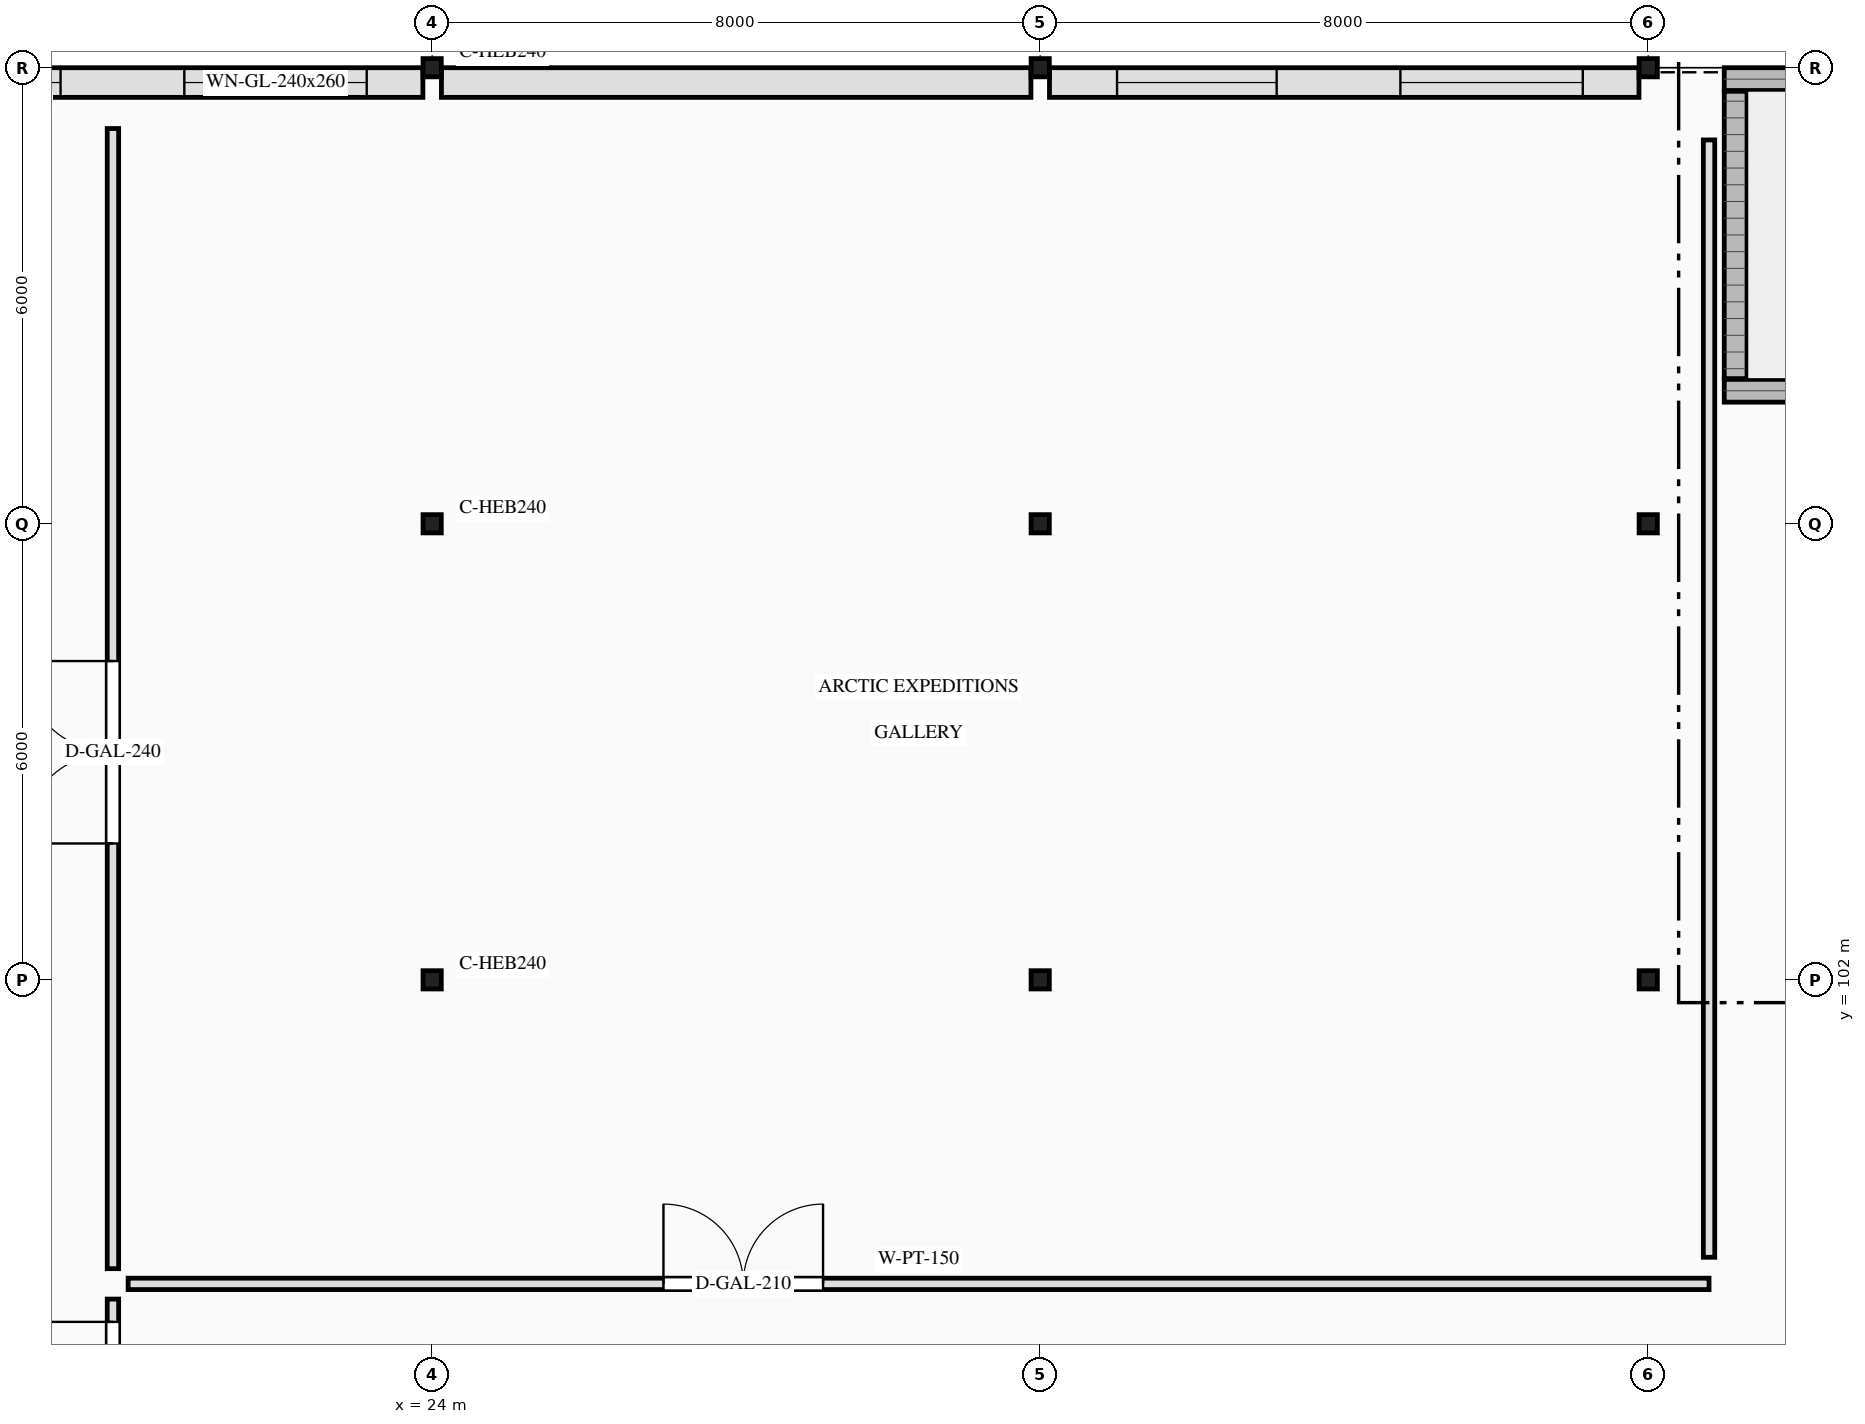
"""IFC4 building model, lengths in metres.
Left out: names, types, materials, properties, quantities, classifications, styles, units other than length and angle.
Written with IfcOpenShell. Run it as: python <this file> out.ifc"""

import sys

from ifc_helpers import new_model, si_unit, direction, frame, frame_2d, origin, origin_2d, place, context, subcontext, project, spatial, rectangle, i_section, extrude, element, fill, save


model = new_model("IFC4")
c1 = context("Model", 3, precision=1e-05, world=origin(), true_north=direction((0.0, 1.0)))
c2 = subcontext(c1, "Body", "Model", "MODEL_VIEW")
j1 = project(units=[si_unit("LENGTHUNIT", "METRE"), si_unit("PLANEANGLEUNIT", "RADIAN")], contexts=[c1])
p1 = place(None, origin())
s1 = spatial("IfcSite", under=j1, at=p1, CompositionType="ELEMENT")
p2 = place(p1, origin())
s2 = spatial("IfcBuilding", under=s1, at=p2, CompositionType="ELEMENT")
p3 = place(p2, frame((0.0, 0.0, 17.6)))
s3 = spatial("IfcBuildingStorey", under=s2, at=p3, CompositionType="ELEMENT", Elevation=17.6)
for number, where, z_axis, x_axis in (
    (1, (41.0, 109.75, 0.0), (0.0, 0.0, 1.0), (1.0, 0.0, 0.0)),
    (2, (41.0, 113.85, 0.0), (0.0, 0.0, 1.0), (1.0, 0.0, 0.0)),
):
    element("IfcWall", number, at=place(p3, frame(where, z_axis=z_axis, x_axis=x_axis)), inside=s3, PredefinedType="SHEAR", context=c2, shape_type="SweptSolid", body=[
        extrude(rectangle(XDim=10.0, YDim=0.3, at=frame_2d((5.0, 0.0))), origin(), (0.0, 0.0, 1.0), 4.2),
    ])
p4 = place(p3, frame((41.15, 109.91, 0.0), z_axis=(0.0, 0.0, 1.0), x_axis=(0.0, 1.0, 0.0)))
e3 = element("IfcWall", 3, at=p4, inside=s3, PredefinedType="SHEAR", context=c2, shape_type="SweptSolid", body=[
    extrude(rectangle(XDim=3.78, YDim=0.3, at=frame_2d((1.89, 0.0))), origin(), (0.0, 0.0, 1.0), 4.2),
])
for number, where, z_axis, x_axis in (
    (4, (24.0, 102.0, 0.0), (0.0, 0.0, 1.0), (1.0, 0.0, 0.0)),
    (5, (24.0, 108.0, 0.0), (0.0, 0.0, 1.0), (1.0, 0.0, 0.0)),
    (6, (24.0, 114.0, 0.0), (0.0, 0.0, 1.0), (1.0, 0.0, 0.0)),
    (7, (32.0, 102.0, 0.0), (0.0, 0.0, 1.0), (1.0, 0.0, 0.0)),
    (8, (32.0, 108.0, 0.0), (0.0, 0.0, 1.0), (1.0, 0.0, 0.0)),
    (9, (32.0, 114.0, 0.0), (0.0, 0.0, 1.0), (1.0, 0.0, 0.0)),
    (10, (40.0, 102.0, 0.0), (0.0, 0.0, 1.0), (1.0, 0.0, 0.0)),
    (11, (40.0, 108.0, 0.0), (0.0, 0.0, 1.0), (1.0, 0.0, 0.0)),
    (12, (40.0, 114.0, 0.0), (0.0, 0.0, 1.0), (1.0, 0.0, 0.0)),
):
    element("IfcColumn", number, at=place(p3, frame(where, z_axis=z_axis, x_axis=x_axis)), inside=s3, PredefinedType="COLUMN", context=c2, shape_type="SweptSolid", body=[
        extrude(i_section(OverallWidth=0.24, OverallDepth=0.24, WebThickness=0.01, FlangeThickness=0.017, FilletRadius=0.021, at=origin_2d()), origin(), (0.0, 0.0, 1.0), 4.2),
    ])
p5 = place(p3, frame((16.122, 113.805, 0.0), z_axis=(0.0, 0.0, 1.0), x_axis=(1.0, 0.0, 0.0)))
e13 = element("IfcWall", 13, at=p5, inside=s3, PredefinedType="SOLIDWALL", context=c2, shape_type="SweptSolid", body=[
    extrude(rectangle(XDim=7.756, YDim=0.39, at=frame_2d((3.878, 0.0))), origin(), (0.0, 0.0, 1.0), 3.505),
])
p6 = place(p5, frame((0.889, 0.0, 0.85)))
e14 = element("IfcOpeningElement", 14, at=p6, cuts=e13, PredefinedType="OPENING", context=c2, shape_type="SweptSolid", body=[
    extrude(rectangle(XDim=2.1, YDim=2.5, at=frame_2d((1.05, 1.25))), frame((0.0, 0.205, 0.0), z_axis=(0.0, -1.0, 0.0), x_axis=(1.0, 0.0, 0.0)), (0.0, 0.0, 1.0), 0.41),
])
p7 = place(p5, frame((4.617, 0.0, 0.765)))
e15 = element("IfcOpeningElement", 15, at=p7, cuts=e13, PredefinedType="OPENING", context=c2, shape_type="SweptSolid", body=[
    extrude(rectangle(XDim=2.4, YDim=2.6, at=frame_2d((1.2, 1.3))), frame((0.0, 0.205, 0.0), z_axis=(0.0, -1.0, 0.0), x_axis=(1.0, 0.0, 0.0)), (0.0, 0.0, 1.0), 0.41),
])
p8 = place(p3, frame((24.122, 113.805, 0.0), z_axis=(0.0, 0.0, 1.0), x_axis=(1.0, 0.0, 0.0)))
e16 = element("IfcWall", 16, at=p8, inside=s3, PredefinedType="SOLIDWALL", context=c2, shape_type="SweptSolid", body=[
    extrude(rectangle(XDim=7.756, YDim=0.39, at=frame_2d((3.878, 0.0))), origin(), (0.0, 0.0, 1.0), 3.505),
])
p9 = place(p3, frame((32.122, 113.805, 0.0), z_axis=(0.0, 0.0, 1.0), x_axis=(1.0, 0.0, 0.0)))
e17 = element("IfcWall", 17, at=p9, inside=s3, PredefinedType="SOLIDWALL", context=c2, shape_type="SweptSolid", body=[
    extrude(rectangle(XDim=7.756, YDim=0.39, at=frame_2d((3.878, 0.0))), origin(), (0.0, 0.0, 1.0), 3.505),
])
p10 = place(p9, frame((0.889, 0.0, 0.85)))
e18 = element("IfcOpeningElement", 18, at=p10, cuts=e17, PredefinedType="OPENING", context=c2, shape_type="SweptSolid", body=[
    extrude(rectangle(XDim=2.1, YDim=2.5, at=frame_2d((1.05, 1.25))), frame((0.0, 0.205, 0.0), z_axis=(0.0, -1.0, 0.0), x_axis=(1.0, 0.0, 0.0)), (0.0, 0.0, 1.0), 0.41),
])
p11 = place(p9, frame((4.617, 0.0, 0.765)))
e19 = element("IfcOpeningElement", 19, at=p11, cuts=e17, PredefinedType="OPENING", context=c2, shape_type="SweptSolid", body=[
    extrude(rectangle(XDim=2.4, YDim=2.6, at=frame_2d((1.2, 1.3))), frame((0.0, 0.205, 0.0), z_axis=(0.0, -1.0, 0.0), x_axis=(1.0, 0.0, 0.0)), (0.0, 0.0, 1.0), 0.41),
])
p12 = place(p3, frame((19.8, 94.2, 0.0), z_axis=(0.0, 0.0, 1.0), x_axis=(0.0, 1.0, 0.0)))
e20 = element("IfcWall", 20, at=p12, inside=s3, PredefinedType="PARTITIONING", context=c2, shape_type="SweptSolid", body=[
    extrude(rectangle(XDim=3.6, YDim=0.15, at=frame_2d((1.8, 0.0))), origin(), (0.0, 0.0, 1.0), 3.96),
])
p13 = place(p12, frame((0.9, 0.0, 0.0)))
e21 = element("IfcOpeningElement", 21, at=p13, cuts=e20, PredefinedType="OPENING", context=c2, shape_type="SweptSolid", body=[
    extrude(rectangle(XDim=2.4, YDim=2.75, at=frame_2d((1.2, 1.375))), frame((0.0, 0.085, 0.0), z_axis=(0.0, -1.0, 0.0), x_axis=(1.0, 0.0, 0.0)), (0.0, 0.0, 1.0), 0.17),
])
p14 = place(p3, frame((20.0, 98.0, 0.0), z_axis=(0.0, 0.0, 1.0), x_axis=(1.0, 0.0, 0.0)))
e22 = element("IfcWall", 22, at=p14, inside=s3, PredefinedType="PARTITIONING", context=c2, shape_type="SweptSolid", body=[
    extrude(rectangle(XDim=20.8, YDim=0.15, at=frame_2d((10.4, 0.0))), origin(), (0.0, 0.0, 1.0), 3.96),
])
p15 = place(p14, frame((7.043, 0.0, 0.0)))
e23 = element("IfcOpeningElement", 23, at=p15, cuts=e22, PredefinedType="OPENING", context=c2, shape_type="SweptSolid", body=[
    extrude(rectangle(XDim=2.1, YDim=2.6, at=frame_2d((1.05, 1.3))), frame((0.0, 0.085, 0.0), z_axis=(0.0, -1.0, 0.0), x_axis=(1.0, 0.0, 0.0)), (0.0, 0.0, 1.0), 0.17),
])
p16 = place(p3, frame((19.8, 98.2, 0.0), z_axis=(0.0, 0.0, 1.0), x_axis=(0.0, 1.0, 0.0)))
e24 = element("IfcWall", 24, at=p16, inside=s3, PredefinedType="PARTITIONING", context=c2, shape_type="SweptSolid", body=[
    extrude(rectangle(XDim=15.0, YDim=0.15, at=frame_2d((7.5, 0.0))), origin(), (0.0, 0.0, 1.0), 3.96),
])
p17 = place(p16, frame((5.594, 0.0, 0.0)))
e25 = element("IfcOpeningElement", 25, at=p17, cuts=e24, PredefinedType="OPENING", context=c2, shape_type="SweptSolid", body=[
    extrude(rectangle(XDim=2.4, YDim=2.75, at=frame_2d((1.2, 1.375))), frame((0.0, 0.085, 0.0), z_axis=(0.0, -1.0, 0.0), x_axis=(1.0, 0.0, 0.0)), (0.0, 0.0, 1.0), 0.17),
])
p18 = place(p3, frame((40.8, 98.35, 0.0), z_axis=(0.0, 0.0, 1.0), x_axis=(0.0, 1.0, 0.0)))
e26 = element("IfcWall", 26, at=p18, inside=s3, PredefinedType="PARTITIONING", context=c2, shape_type="SweptSolid", body=[
    extrude(rectangle(XDim=14.7, YDim=0.15, at=frame_2d((7.35, 0.0))), origin(), (0.0, 0.0, 1.0), 3.96),
])
p19 = place(p6, origin())
e27 = element("IfcWindow", 27, at=p19, inside=s3, PartitioningType="DOUBLE_PANEL_VERTICAL", PredefinedType="WINDOW", context=c2, shape_type="SweptSolid", body=[
    extrude(rectangle(XDim=2.1, YDim=2.5, at=frame_2d((1.05, 1.25))), frame((0.0, 0.03, 0.0), z_axis=(0.0, -1.0, 0.0), x_axis=(1.0, 0.0, 0.0)), (0.0, 0.0, 1.0), 0.06),
])
fill(e14, e27)
p20 = place(p7, origin())
e28 = element("IfcWindow", 28, at=p20, inside=s3, PartitioningType="TRIPLE_PANEL_VERTICAL", PredefinedType="WINDOW", context=c2, shape_type="SweptSolid", body=[
    extrude(rectangle(XDim=2.4, YDim=2.6, at=frame_2d((1.2, 1.3))), frame((0.0, 0.03, 0.0), z_axis=(0.0, -1.0, 0.0), x_axis=(1.0, 0.0, 0.0)), (0.0, 0.0, 1.0), 0.06),
])
fill(e15, e28)
p21 = place(p10, origin())
e29 = element("IfcWindow", 29, at=p21, inside=s3, PartitioningType="DOUBLE_PANEL_VERTICAL", PredefinedType="WINDOW", context=c2, shape_type="SweptSolid", body=[
    extrude(rectangle(XDim=2.1, YDim=2.5, at=frame_2d((1.05, 1.25))), frame((0.0, 0.03, 0.0), z_axis=(0.0, -1.0, 0.0), x_axis=(1.0, 0.0, 0.0)), (0.0, 0.0, 1.0), 0.06),
])
fill(e18, e29)
p22 = place(p11, origin())
e30 = element("IfcWindow", 30, at=p22, inside=s3, PartitioningType="TRIPLE_PANEL_VERTICAL", PredefinedType="WINDOW", context=c2, shape_type="SweptSolid", body=[
    extrude(rectangle(XDim=2.4, YDim=2.6, at=frame_2d((1.2, 1.3))), frame((0.0, 0.03, 0.0), z_axis=(0.0, -1.0, 0.0), x_axis=(1.0, 0.0, 0.0)), (0.0, 0.0, 1.0), 0.06),
])
fill(e19, e30)
p23 = place(p13, origin())
e31 = element("IfcDoor", 31, at=p23, inside=s3, OperationType="DOUBLE_DOOR_DOUBLE_SWING", PredefinedType="DOOR", context=c2, shape_type="SweptSolid", body=[
    extrude(rectangle(XDim=2.4, YDim=2.75, at=frame_2d((1.2, 1.375))), frame((0.0, 0.025, 0.0), z_axis=(0.0, -1.0, 0.0), x_axis=(1.0, 0.0, 0.0)), (0.0, 0.0, 1.0), 0.05),
])
fill(e21, e31)
p24 = place(p15, origin())
e32 = element("IfcDoor", 32, at=p24, inside=s3, OperationType="DOUBLE_DOOR_SINGLE_SWING", PredefinedType="DOOR", context=c2, shape_type="SweptSolid", body=[
    extrude(rectangle(XDim=2.1, YDim=2.6, at=frame_2d((1.05, 1.3))), frame((0.0, 0.025, 0.0), z_axis=(0.0, -1.0, 0.0), x_axis=(1.0, 0.0, 0.0)), (0.0, 0.0, 1.0), 0.05),
])
fill(e23, e32)
p25 = place(p17, origin())
e33 = element("IfcDoor", 33, at=p25, inside=s3, OperationType="DOUBLE_DOOR_DOUBLE_SWING", PredefinedType="DOOR", context=c2, shape_type="SweptSolid", body=[
    extrude(rectangle(XDim=2.4, YDim=2.75, at=frame_2d((1.2, 1.375))), frame((0.0, 0.025, 0.0), z_axis=(0.0, -1.0, 0.0), x_axis=(1.0, 0.0, 0.0)), (0.0, 0.0, 1.0), 0.05),
])
fill(e25, e33)
save(model, sys.argv[1])
